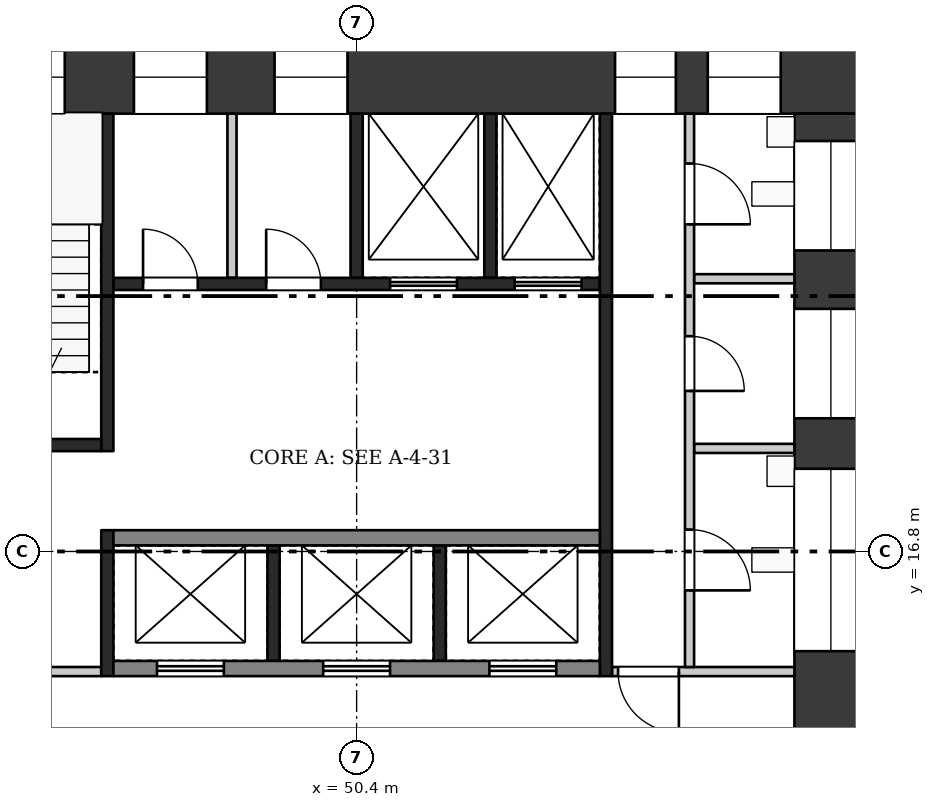
"""IFC4 building model, lengths in metres.
Left out: names, types, materials, properties, quantities, classifications, styles, units other than length and angle.
Written with IfcOpenShell. Run it as: python <this file> out.ifc"""

import sys

from ifc_helpers import new_model, si_unit, direction, frame, frame_2d, origin, place, context, subcontext, project, spatial, rectangle, extrude, element, fill, save


model = new_model("IFC4")
c1 = context("Model", 3, precision=1e-05, world=origin(), true_north=direction((0.0, 1.0)))
c2 = subcontext(c1, "Body", "Model", "MODEL_VIEW")
j1 = project(units=[si_unit("LENGTHUNIT", "METRE"), si_unit("PLANEANGLEUNIT", "RADIAN")], contexts=[c1])
p1 = place(None, origin())
s1 = spatial("IfcSite", under=j1, at=p1, CompositionType="ELEMENT")
p2 = place(p1, origin())
s2 = spatial("IfcBuilding", under=s1, at=p2, CompositionType="ELEMENT")
p3 = place(p2, frame((0.0, 0.0, 224.7)))
s3 = spatial("IfcBuildingStorey", under=s2, at=p3, CompositionType="ELEMENT", Elevation=224.7)
p4 = place(p3, frame((42.0, 24.6, 0.0), z_axis=(0.0, 0.0, 1.0), x_axis=(1.0, 0.0, 0.0)))
e1 = element("IfcWall", 1, at=p4, inside=s3, PredefinedType="SHEAR", context=c2, shape_type="SweptSolid", body=[
    extrude(rectangle(XDim=16.8, YDim=1.2, at=frame_2d((8.4, 0.0))), origin(), (0.0, 0.0, 1.0), 3.22),
])
p5 = place(p4, frame((1.8, 0.0, 0.5)))
e2 = element("IfcOpeningElement", 2, at=p5, cuts=e1, PredefinedType="OPENING", context=c2, shape_type="SweptSolid", body=[
    extrude(rectangle(XDim=1.8, YDim=2.4, at=frame_2d((0.9, 1.2))), frame((0.0, 0.61, 0.0), z_axis=(0.0, -1.0, 0.0), x_axis=(1.0, 0.0, 0.0)), (0.0, 0.0, 1.0), 1.22),
])
p6 = place(p4, frame((4.738, 0.0, 1.6)))
e3 = element("IfcOpeningElement", 3, at=p6, cuts=e1, PredefinedType="OPENING", context=c2, shape_type="SweptSolid", body=[
    extrude(rectangle(XDim=1.2, YDim=1.2, at=frame_2d((0.6, 0.6))), frame((0.0, 0.61, 0.0), z_axis=(0.0, -1.0, 0.0), x_axis=(1.0, 0.0, 0.0)), (0.0, 0.0, 1.0), 1.22),
])
p7 = place(p4, frame((7.05, 0.0, 1.6)))
e4 = element("IfcOpeningElement", 4, at=p7, cuts=e1, PredefinedType="OPENING", context=c2, shape_type="SweptSolid", body=[
    extrude(rectangle(XDim=1.2, YDim=1.2, at=frame_2d((0.6, 0.6))), frame((0.0, 0.61, 0.0), z_axis=(0.0, -1.0, 0.0), x_axis=(1.0, 0.0, 0.0)), (0.0, 0.0, 1.0), 1.22),
])
p8 = place(p4, frame((12.65, 0.0, 0.6)))
e5 = element("IfcOpeningElement", 5, at=p8, cuts=e1, PredefinedType="OPENING", context=c2, shape_type="SweptSolid", body=[
    extrude(rectangle(XDim=1.0, YDim=2.1, at=frame_2d((0.5, 1.05))), frame((0.0, 0.61, 0.0), z_axis=(0.0, -1.0, 0.0), x_axis=(1.0, 0.0, 0.0)), (0.0, 0.0, 1.0), 1.22),
])
p9 = place(p4, frame((14.175, 0.0, 1.6)))
e6 = element("IfcOpeningElement", 6, at=p9, cuts=e1, PredefinedType="OPENING", context=c2, shape_type="SweptSolid", body=[
    extrude(rectangle(XDim=1.2, YDim=1.2, at=frame_2d((0.6, 0.6))), frame((0.0, 0.61, 0.0), z_axis=(0.0, -1.0, 0.0), x_axis=(1.0, 0.0, 0.0)), (0.0, 0.0, 1.0), 1.22),
])
p10 = place(p3, frame((58.2, 9.6, 0.0), z_axis=(0.0, 0.0, 1.0), x_axis=(0.0, 1.0, 0.0)))
e7 = element("IfcWall", 7, at=p10, inside=s3, PredefinedType="SHEAR", context=c2, shape_type="SweptSolid", body=[
    extrude(rectangle(XDim=14.4, YDim=1.2, at=frame_2d((7.2, 0.0))), origin(), (0.0, 0.0, 1.0), 3.22),
])
p11 = place(p10, frame((1.105, 0.0, 0.6)))
e8 = element("IfcOpeningElement", 8, at=p11, cuts=e7, PredefinedType="OPENING", context=c2, shape_type="SweptSolid", body=[
    extrude(rectangle(XDim=3.0, YDim=2.1, at=frame_2d((1.5, 1.05))), frame((0.0, 0.61, 0.0), z_axis=(0.0, -1.0, 0.0), x_axis=(1.0, 0.0, 0.0)), (0.0, 0.0, 1.0), 1.22),
])
p12 = place(p10, frame((5.56, 0.0, 1.6)))
e9 = element("IfcOpeningElement", 9, at=p12, cuts=e7, PredefinedType="OPENING", context=c2, shape_type="SweptSolid", body=[
    extrude(rectangle(XDim=3.0, YDim=1.2, at=frame_2d((1.5, 0.6))), frame((0.0, 0.61, 0.0), z_axis=(0.0, -1.0, 0.0), x_axis=(1.0, 0.0, 0.0)), (0.0, 0.0, 1.0), 1.22),
])
p13 = place(p10, frame((9.39, 0.0, 1.6)))
e10 = element("IfcOpeningElement", 10, at=p13, cuts=e7, PredefinedType="OPENING", context=c2, shape_type="SweptSolid", body=[
    extrude(rectangle(XDim=1.8, YDim=1.2, at=frame_2d((0.9, 0.6))), frame((0.0, 0.61, 0.0), z_axis=(0.0, -1.0, 0.0), x_axis=(1.0, 0.0, 0.0)), (0.0, 0.0, 1.0), 1.22),
])
p14 = place(p10, frame((12.15, 0.0, 1.6)))
e11 = element("IfcOpeningElement", 11, at=p14, cuts=e7, PredefinedType="OPENING", context=c2, shape_type="SweptSolid", body=[
    extrude(rectangle(XDim=1.8, YDim=1.2, at=frame_2d((0.9, 0.6))), frame((0.0, 0.61, 0.0), z_axis=(0.0, -1.0, 0.0), x_axis=(1.0, 0.0, 0.0)), (0.0, 0.0, 1.0), 1.22),
])
for number, where, z_axis, x_axis in (
    (12, (49.033, 15.0, 0.0), (0.0, 0.0, 1.0), (0.0, 1.0, 0.0)),
    (13, (51.767, 15.0, 0.0), (0.0, 0.0, 1.0), (0.0, 1.0, 0.0)),
):
    element("IfcWall", number, at=place(p3, frame(where, z_axis=z_axis, x_axis=x_axis)), inside=s3, PredefinedType="SHEAR", context=c2, shape_type="SweptSolid", body=[
        extrude(rectangle(XDim=1.9, YDim=0.2, at=frame_2d((0.95, 0.0))), origin(), (0.0, 0.0, 1.0), 3.22),
    ])
p15 = place(p3, frame((46.4, 14.875, 0.0), z_axis=(0.0, 0.0, 1.0), x_axis=(1.0, 0.0, 0.0)))
e14 = element("IfcWall", 14, at=p15, inside=s3, PredefinedType="SHEAR", context=c2, shape_type="SweptSolid", body=[
    extrude(rectangle(XDim=8.0, YDim=0.25, at=frame_2d((4.0, 0.0))), origin(), (0.0, 0.0, 1.0), 3.22),
])
p16 = place(p15, frame((0.717, 0.0, 0.0)))
e15 = element("IfcOpeningElement", 15, at=p16, cuts=e14, PredefinedType="OPENING", context=c2, shape_type="SweptSolid", body=[
    extrude(rectangle(XDim=1.1, YDim=2.1, at=frame_2d((0.55, 1.05))), frame((0.0, 0.135, 0.0), z_axis=(0.0, -1.0, 0.0), x_axis=(1.0, 0.0, 0.0)), (0.0, 0.0, 1.0), 0.27),
])
p17 = place(p15, frame((3.45, 0.0, 0.0)))
e16 = element("IfcOpeningElement", 16, at=p17, cuts=e14, PredefinedType="OPENING", context=c2, shape_type="SweptSolid", body=[
    extrude(rectangle(XDim=1.1, YDim=2.1, at=frame_2d((0.55, 1.05))), frame((0.0, 0.135, 0.0), z_axis=(0.0, -1.0, 0.0), x_axis=(1.0, 0.0, 0.0)), (0.0, 0.0, 1.0), 0.27),
])
p18 = place(p15, frame((6.183, 0.0, 0.0)))
e17 = element("IfcOpeningElement", 17, at=p18, cuts=e14, PredefinedType="OPENING", context=c2, shape_type="SweptSolid", body=[
    extrude(rectangle(XDim=1.1, YDim=2.1, at=frame_2d((0.55, 1.05))), frame((0.0, 0.135, 0.0), z_axis=(0.0, -1.0, 0.0), x_axis=(1.0, 0.0, 0.0)), (0.0, 0.0, 1.0), 0.27),
])
p19 = place(p3, frame((46.4, 17.025, 0.0), z_axis=(0.0, 0.0, 1.0), x_axis=(1.0, 0.0, 0.0)))
e18 = element("IfcWall", 18, at=p19, inside=s3, PredefinedType="SHEAR", context=c2, shape_type="SweptSolid", body=[
    extrude(rectangle(XDim=8.0, YDim=0.25, at=frame_2d((4.0, 0.0))), origin(), (0.0, 0.0, 1.0), 3.22),
])
for number, where, z_axis, x_axis in (
    (19, (50.4, 21.3, 0.0), (0.0, 0.0, 1.0), (0.0, 1.0, 0.0)),
    (20, (52.6, 21.3, 0.0), (0.0, 0.0, 1.0), (0.0, 1.0, 0.0)),
):
    element("IfcWall", number, at=place(p3, frame(where, z_axis=z_axis, x_axis=x_axis)), inside=s3, PredefinedType="SHEAR", context=c2, shape_type="SweptSolid", body=[
        extrude(rectangle(XDim=2.7, YDim=0.2, at=frame_2d((1.35, 0.0))), origin(), (0.0, 0.0, 1.0), 3.22),
    ])
p20 = place(p3, frame((48.35, 21.3, 0.0), z_axis=(0.0, 0.0, 1.0), x_axis=(0.0, 1.0, 0.0)))
e21 = element("IfcWall", 21, at=p20, inside=s3, PredefinedType="PARTITIONING", context=c2, shape_type="SweptSolid", body=[
    extrude(rectangle(XDim=2.7, YDim=0.15, at=frame_2d((1.35, 0.0))), origin(), (0.0, 0.0, 1.0), 3.22),
])
p21 = place(p3, frame((46.4, 21.2, 0.0), z_axis=(0.0, 0.0, 1.0), x_axis=(1.0, 0.0, 0.0)))
e22 = element("IfcWall", 22, at=p21, inside=s3, PredefinedType="SHEAR", context=c2, shape_type="SweptSolid", body=[
    extrude(rectangle(XDim=8.0, YDim=0.2, at=frame_2d((4.0, 0.0))), origin(), (0.0, 0.0, 1.0), 3.22),
])
p22 = place(p21, frame((0.488, 0.0, 0.0)))
e23 = element("IfcOpeningElement", 23, at=p22, cuts=e22, PredefinedType="OPENING", context=c2, shape_type="SweptSolid", body=[
    extrude(rectangle(XDim=0.9, YDim=2.1, at=frame_2d((0.45, 1.05))), frame((0.0, 0.11, 0.0), z_axis=(0.0, -1.0, 0.0), x_axis=(1.0, 0.0, 0.0)), (0.0, 0.0, 1.0), 0.22),
])
p23 = place(p21, frame((2.512, 0.0, 0.0)))
e24 = element("IfcOpeningElement", 24, at=p23, cuts=e22, PredefinedType="OPENING", context=c2, shape_type="SweptSolid", body=[
    extrude(rectangle(XDim=0.9, YDim=2.1, at=frame_2d((0.45, 1.05))), frame((0.0, 0.11, 0.0), z_axis=(0.0, -1.0, 0.0), x_axis=(1.0, 0.0, 0.0)), (0.0, 0.0, 1.0), 0.22),
])
p24 = place(p21, frame((4.55, 0.0, 0.0)))
e25 = element("IfcOpeningElement", 25, at=p24, cuts=e22, PredefinedType="OPENING", context=c2, shape_type="SweptSolid", body=[
    extrude(rectangle(XDim=1.1, YDim=2.1, at=frame_2d((0.55, 1.05))), frame((0.0, 0.11, 0.0), z_axis=(0.0, -1.0, 0.0), x_axis=(1.0, 0.0, 0.0)), (0.0, 0.0, 1.0), 0.22),
])
p25 = place(p21, frame((6.6, 0.0, 0.0)))
e26 = element("IfcOpeningElement", 26, at=p25, cuts=e22, PredefinedType="OPENING", context=c2, shape_type="SweptSolid", body=[
    extrude(rectangle(XDim=1.1, YDim=2.1, at=frame_2d((0.55, 1.05))), frame((0.0, 0.11, 0.0), z_axis=(0.0, -1.0, 0.0), x_axis=(1.0, 0.0, 0.0)), (0.0, 0.0, 1.0), 0.22),
])
p26 = place(p3, frame((46.3, 14.75, 0.0), z_axis=(0.0, 0.0, 1.0), x_axis=(0.0, 1.0, 0.0)))
e27 = element("IfcWall", 27, at=p26, inside=s3, PredefinedType="SHEAR", context=c2, shape_type="SweptSolid", body=[
    extrude(rectangle(XDim=2.4, YDim=0.2, at=frame_2d((1.2, 0.0))), origin(), (0.0, 0.0, 1.0), 3.22),
])
p27 = place(p3, frame((46.3, 18.45, 0.0), z_axis=(0.0, 0.0, 1.0), x_axis=(0.0, 1.0, 0.0)))
e28 = element("IfcWall", 28, at=p27, inside=s3, PredefinedType="SHEAR", context=c2, shape_type="SweptSolid", body=[
    extrude(rectangle(XDim=5.55, YDim=0.2, at=frame_2d((2.775, 0.0))), origin(), (0.0, 0.0, 1.0), 3.22),
])
p28 = place(p3, frame((43.2, 14.825, 0.0), z_axis=(0.0, 0.0, 1.0), x_axis=(1.0, 0.0, 0.0)))
e29 = element("IfcWall", 29, at=p28, inside=s3, PredefinedType="PARTITIONING", context=c2, shape_type="SweptSolid", body=[
    extrude(rectangle(XDim=3.0, YDim=0.15, at=frame_2d((1.5, 0.0))), origin(), (0.0, 0.0, 1.0), 3.22),
])
p29 = place(p28, frame((1.0, 0.0, 0.0)))
e30 = element("IfcOpeningElement", 30, at=p29, cuts=e29, PredefinedType="OPENING", context=c2, shape_type="SweptSolid", body=[
    extrude(rectangle(XDim=1.0, YDim=2.1, at=frame_2d((0.5, 1.05))), frame((0.0, 0.085, 0.0), z_axis=(0.0, -1.0, 0.0), x_axis=(1.0, 0.0, 0.0)), (0.0, 0.0, 1.0), 0.17),
])
p30 = place(p3, frame((43.2, 18.55, 0.0), z_axis=(0.0, 0.0, 1.0), x_axis=(1.0, 0.0, 0.0)))
e31 = element("IfcWall", 31, at=p30, inside=s3, PredefinedType="SHEAR", context=c2, shape_type="SweptSolid", body=[
    extrude(rectangle(XDim=3.0, YDim=0.2, at=frame_2d((1.5, 0.0))), origin(), (0.0, 0.0, 1.0), 3.22),
])
p31 = place(p30, frame((1.0, 0.0, 0.0)))
e32 = element("IfcOpeningElement", 32, at=p31, cuts=e31, PredefinedType="OPENING", context=c2, shape_type="SweptSolid", body=[
    extrude(rectangle(XDim=1.0, YDim=2.1, at=frame_2d((0.5, 1.05))), frame((0.0, 0.11, 0.0), z_axis=(0.0, -1.0, 0.0), x_axis=(1.0, 0.0, 0.0)), (0.0, 0.0, 1.0), 0.22),
])
p32 = place(p3, frame((54.5, 14.75, 0.0), z_axis=(0.0, 0.0, 1.0), x_axis=(0.0, 1.0, 0.0)))
e33 = element("IfcWall", 33, at=p32, inside=s3, PredefinedType="SHEAR", context=c2, shape_type="SweptSolid", body=[
    extrude(rectangle(XDim=9.25, YDim=0.2, at=frame_2d((4.625, 0.0))), origin(), (0.0, 0.0, 1.0), 3.22),
])
p33 = place(p3, frame((54.6, 14.825, 0.0), z_axis=(0.0, 0.0, 1.0), x_axis=(1.0, 0.0, 0.0)))
e34 = element("IfcWall", 34, at=p33, inside=s3, PredefinedType="PARTITIONING", context=c2, shape_type="SweptSolid", body=[
    extrude(rectangle(XDim=3.0, YDim=0.15, at=frame_2d((1.5, 0.0))), origin(), (0.0, 0.0, 1.0), 3.22),
])
p34 = place(p33, frame((0.1, 0.0, 0.0)))
e35 = element("IfcOpeningElement", 35, at=p34, cuts=e34, PredefinedType="OPENING", context=c2, shape_type="SweptSolid", body=[
    extrude(rectangle(XDim=1.0, YDim=2.1, at=frame_2d((0.5, 1.05))), frame((0.0, 0.085, 0.0), z_axis=(0.0, -1.0, 0.0), x_axis=(1.0, 0.0, 0.0)), (0.0, 0.0, 1.0), 0.17),
])
for number, where, z_axis, x_axis in (
    (36, (55.95, 18.495, 0.0), (0.0, 0.0, 1.0), (1.0, 0.0, 0.0)),
    (37, (55.95, 21.285, 0.0), (0.0, 0.0, 1.0), (1.0, 0.0, 0.0)),
):
    element("IfcWall", number, at=place(p3, frame(where, z_axis=z_axis, x_axis=x_axis)), inside=s3, PredefinedType="PARTITIONING", context=c2, shape_type="SweptSolid", body=[
        extrude(rectangle(XDim=1.65, YDim=0.15, at=frame_2d((0.825, 0.0))), origin(), (0.0, 0.0, 1.0), 3.22),
    ])
p35 = place(p3, frame((55.875, 14.9, 0.0), z_axis=(0.0, 0.0, 1.0), x_axis=(0.0, 1.0, 0.0)))
e38 = element("IfcWall", 38, at=p35, inside=s3, PredefinedType="PARTITIONING", context=c2, shape_type="SweptSolid", body=[
    extrude(rectangle(XDim=9.1, YDim=0.15, at=frame_2d((4.55, 0.0))), origin(), (0.0, 0.0, 1.0), 3.22),
])
p36 = place(p35, frame((1.26, 0.0, 0.0)))
e39 = element("IfcOpeningElement", 39, at=p36, cuts=e38, PredefinedType="OPENING", context=c2, shape_type="SweptSolid", body=[
    extrude(rectangle(XDim=1.0, YDim=2.1, at=frame_2d((0.5, 1.05))), frame((0.0, 0.085, 0.0), z_axis=(0.0, -1.0, 0.0), x_axis=(1.0, 0.0, 0.0)), (0.0, 0.0, 1.0), 0.17),
])
p37 = place(p35, frame((4.54, 0.0, 0.0)))
e40 = element("IfcOpeningElement", 40, at=p37, cuts=e38, PredefinedType="OPENING", context=c2, shape_type="SweptSolid", body=[
    extrude(rectangle(XDim=0.9, YDim=2.1, at=frame_2d((0.45, 1.05))), frame((0.0, 0.085, 0.0), z_axis=(0.0, -1.0, 0.0), x_axis=(1.0, 0.0, 0.0)), (0.0, 0.0, 1.0), 0.17),
])
p38 = place(p35, frame((7.28, 0.0, 0.0)))
e41 = element("IfcOpeningElement", 41, at=p38, cuts=e38, PredefinedType="OPENING", context=c2, shape_type="SweptSolid", body=[
    extrude(rectangle(XDim=1.0, YDim=2.1, at=frame_2d((0.5, 1.05))), frame((0.0, 0.085, 0.0), z_axis=(0.0, -1.0, 0.0), x_axis=(1.0, 0.0, 0.0)), (0.0, 0.0, 1.0), 0.17),
])
p39 = place(p16, origin())
e42 = element("IfcDoor", 42, at=p39, inside=s3, OperationType="DOUBLE_DOOR_SLIDING", PredefinedType="DOOR", context=c2, shape_type="SweptSolid", body=[
    extrude(rectangle(XDim=1.1, YDim=2.1, at=frame_2d((0.55, 1.05))), frame((0.0, 0.025, 0.0), z_axis=(0.0, -1.0, 0.0), x_axis=(1.0, 0.0, 0.0)), (0.0, 0.0, 1.0), 0.05),
])
fill(e15, e42)
p40 = place(p17, origin())
e43 = element("IfcDoor", 43, at=p40, inside=s3, OperationType="DOUBLE_DOOR_SLIDING", PredefinedType="DOOR", context=c2, shape_type="SweptSolid", body=[
    extrude(rectangle(XDim=1.1, YDim=2.1, at=frame_2d((0.55, 1.05))), frame((0.0, 0.025, 0.0), z_axis=(0.0, -1.0, 0.0), x_axis=(1.0, 0.0, 0.0)), (0.0, 0.0, 1.0), 0.05),
])
fill(e16, e43)
p41 = place(p18, origin())
e44 = element("IfcDoor", 44, at=p41, inside=s3, OperationType="DOUBLE_DOOR_SLIDING", PredefinedType="DOOR", context=c2, shape_type="SweptSolid", body=[
    extrude(rectangle(XDim=1.1, YDim=2.1, at=frame_2d((0.55, 1.05))), frame((0.0, 0.025, 0.0), z_axis=(0.0, -1.0, 0.0), x_axis=(1.0, 0.0, 0.0)), (0.0, 0.0, 1.0), 0.05),
])
fill(e17, e44)
p42 = place(p22, origin())
e45 = element("IfcDoor", 45, at=p42, inside=s3, OperationType="SINGLE_SWING_LEFT", PredefinedType="DOOR", context=c2, shape_type="SweptSolid", body=[
    extrude(rectangle(XDim=0.9, YDim=2.1, at=frame_2d((0.45, 1.05))), frame((0.0, 0.025, 0.0), z_axis=(0.0, -1.0, 0.0), x_axis=(1.0, 0.0, 0.0)), (0.0, 0.0, 1.0), 0.05),
])
fill(e23, e45)
p43 = place(p23, origin())
e46 = element("IfcDoor", 46, at=p43, inside=s3, OperationType="SINGLE_SWING_LEFT", PredefinedType="DOOR", context=c2, shape_type="SweptSolid", body=[
    extrude(rectangle(XDim=0.9, YDim=2.1, at=frame_2d((0.45, 1.05))), frame((0.0, 0.025, 0.0), z_axis=(0.0, -1.0, 0.0), x_axis=(1.0, 0.0, 0.0)), (0.0, 0.0, 1.0), 0.05),
])
fill(e24, e46)
p44 = place(p24, origin())
e47 = element("IfcDoor", 47, at=p44, inside=s3, OperationType="DOUBLE_DOOR_SLIDING", PredefinedType="DOOR", context=c2, shape_type="SweptSolid", body=[
    extrude(rectangle(XDim=1.1, YDim=2.1, at=frame_2d((0.55, 1.05))), frame((0.0, 0.025, 0.0), z_axis=(0.0, -1.0, 0.0), x_axis=(1.0, 0.0, 0.0)), (0.0, 0.0, 1.0), 0.05),
])
fill(e25, e47)
p45 = place(p25, origin())
e48 = element("IfcDoor", 48, at=p45, inside=s3, OperationType="DOUBLE_DOOR_SLIDING", PredefinedType="DOOR", context=c2, shape_type="SweptSolid", body=[
    extrude(rectangle(XDim=1.1, YDim=2.1, at=frame_2d((0.55, 1.05))), frame((0.0, 0.025, 0.0), z_axis=(0.0, -1.0, 0.0), x_axis=(1.0, 0.0, 0.0)), (0.0, 0.0, 1.0), 0.05),
])
fill(e26, e48)
p46 = place(p34, frame((1.0, 0.0, 0.0), z_axis=(0.0, 0.0, 1.0), x_axis=(-1.0, 0.0, 0.0)))
e49 = element("IfcDoor", 49, at=p46, inside=s3, OperationType="SINGLE_SWING_LEFT", PredefinedType="DOOR", context=c2, shape_type="SweptSolid", body=[
    extrude(rectangle(XDim=1.0, YDim=2.1, at=frame_2d((0.5, 1.05))), frame((0.0, 0.025, 0.0), z_axis=(0.0, -1.0, 0.0), x_axis=(1.0, 0.0, 0.0)), (0.0, 0.0, 1.0), 0.05),
])
fill(e35, e49)
p47 = place(p36, frame((1.0, 0.0, 0.0), z_axis=(0.0, 0.0, 1.0), x_axis=(-1.0, 0.0, 0.0)))
e50 = element("IfcDoor", 50, at=p47, inside=s3, OperationType="SINGLE_SWING_RIGHT", PredefinedType="DOOR", context=c2, shape_type="SweptSolid", body=[
    extrude(rectangle(XDim=1.0, YDim=2.1, at=frame_2d((0.5, 1.05))), frame((0.0, 0.025, 0.0), z_axis=(0.0, -1.0, 0.0), x_axis=(1.0, 0.0, 0.0)), (0.0, 0.0, 1.0), 0.05),
])
fill(e39, e50)
p48 = place(p37, frame((0.9, 0.0, 0.0), z_axis=(0.0, 0.0, 1.0), x_axis=(-1.0, 0.0, 0.0)))
e51 = element("IfcDoor", 51, at=p48, inside=s3, OperationType="SINGLE_SWING_RIGHT", PredefinedType="DOOR", context=c2, shape_type="SweptSolid", body=[
    extrude(rectangle(XDim=0.9, YDim=2.1, at=frame_2d((0.45, 1.05))), frame((0.0, 0.025, 0.0), z_axis=(0.0, -1.0, 0.0), x_axis=(1.0, 0.0, 0.0)), (0.0, 0.0, 1.0), 0.05),
])
fill(e40, e51)
p49 = place(p38, frame((1.0, 0.0, 0.0), z_axis=(0.0, 0.0, 1.0), x_axis=(-1.0, 0.0, 0.0)))
e52 = element("IfcDoor", 52, at=p49, inside=s3, OperationType="SINGLE_SWING_RIGHT", PredefinedType="DOOR", context=c2, shape_type="SweptSolid", body=[
    extrude(rectangle(XDim=1.0, YDim=2.1, at=frame_2d((0.5, 1.05))), frame((0.0, 0.025, 0.0), z_axis=(0.0, -1.0, 0.0), x_axis=(1.0, 0.0, 0.0)), (0.0, 0.0, 1.0), 0.05),
])
fill(e41, e52)
p50 = place(p5, origin())
e53 = element("IfcWindow", 53, at=p50, inside=s3, PartitioningType="SINGLE_PANEL", PredefinedType="WINDOW", context=c2, shape_type="SweptSolid", body=[
    extrude(rectangle(XDim=1.8, YDim=2.4, at=frame_2d((0.9, 1.2))), frame((0.0, 0.03, 0.0), z_axis=(0.0, -1.0, 0.0), x_axis=(1.0, 0.0, 0.0)), (0.0, 0.0, 1.0), 0.06),
])
fill(e2, e53)
p51 = place(p6, origin())
e54 = element("IfcWindow", 54, at=p51, inside=s3, PartitioningType="SINGLE_PANEL", PredefinedType="WINDOW", context=c2, shape_type="SweptSolid", body=[
    extrude(rectangle(XDim=1.2, YDim=1.2, at=frame_2d((0.6, 0.6))), frame((0.0, 0.03, 0.0), z_axis=(0.0, -1.0, 0.0), x_axis=(1.0, 0.0, 0.0)), (0.0, 0.0, 1.0), 0.06),
])
fill(e3, e54)
p52 = place(p7, origin())
e55 = element("IfcWindow", 55, at=p52, inside=s3, PartitioningType="SINGLE_PANEL", PredefinedType="WINDOW", context=c2, shape_type="SweptSolid", body=[
    extrude(rectangle(XDim=1.2, YDim=1.2, at=frame_2d((0.6, 0.6))), frame((0.0, 0.03, 0.0), z_axis=(0.0, -1.0, 0.0), x_axis=(1.0, 0.0, 0.0)), (0.0, 0.0, 1.0), 0.06),
])
fill(e4, e55)
p53 = place(p8, origin())
e56 = element("IfcWindow", 56, at=p53, inside=s3, PartitioningType="SINGLE_PANEL", PredefinedType="WINDOW", context=c2, shape_type="SweptSolid", body=[
    extrude(rectangle(XDim=1.0, YDim=2.1, at=frame_2d((0.5, 1.05))), frame((0.0, 0.03, 0.0), z_axis=(0.0, -1.0, 0.0), x_axis=(1.0, 0.0, 0.0)), (0.0, 0.0, 1.0), 0.06),
])
fill(e5, e56)
p54 = place(p9, origin())
e57 = element("IfcWindow", 57, at=p54, inside=s3, PartitioningType="SINGLE_PANEL", PredefinedType="WINDOW", context=c2, shape_type="SweptSolid", body=[
    extrude(rectangle(XDim=1.2, YDim=1.2, at=frame_2d((0.6, 0.6))), frame((0.0, 0.03, 0.0), z_axis=(0.0, -1.0, 0.0), x_axis=(1.0, 0.0, 0.0)), (0.0, 0.0, 1.0), 0.06),
])
fill(e6, e57)
p55 = place(p12, origin())
e58 = element("IfcWindow", 58, at=p55, inside=s3, PartitioningType="SINGLE_PANEL", PredefinedType="WINDOW", context=c2, shape_type="SweptSolid", body=[
    extrude(rectangle(XDim=3.0, YDim=1.2, at=frame_2d((1.5, 0.6))), frame((0.0, 0.03, 0.0), z_axis=(0.0, -1.0, 0.0), x_axis=(1.0, 0.0, 0.0)), (0.0, 0.0, 1.0), 0.06),
])
fill(e9, e58)
p56 = place(p13, origin())
e59 = element("IfcWindow", 59, at=p56, inside=s3, PartitioningType="SINGLE_PANEL", PredefinedType="WINDOW", context=c2, shape_type="SweptSolid", body=[
    extrude(rectangle(XDim=1.8, YDim=1.2, at=frame_2d((0.9, 0.6))), frame((0.0, 0.03, 0.0), z_axis=(0.0, -1.0, 0.0), x_axis=(1.0, 0.0, 0.0)), (0.0, 0.0, 1.0), 0.06),
])
fill(e10, e59)
p57 = place(p14, origin())
e60 = element("IfcWindow", 60, at=p57, inside=s3, PartitioningType="SINGLE_PANEL", PredefinedType="WINDOW", context=c2, shape_type="SweptSolid", body=[
    extrude(rectangle(XDim=1.8, YDim=1.2, at=frame_2d((0.9, 0.6))), frame((0.0, 0.03, 0.0), z_axis=(0.0, -1.0, 0.0), x_axis=(1.0, 0.0, 0.0)), (0.0, 0.0, 1.0), 0.06),
])
fill(e11, e60)
save(model, sys.argv[1])
